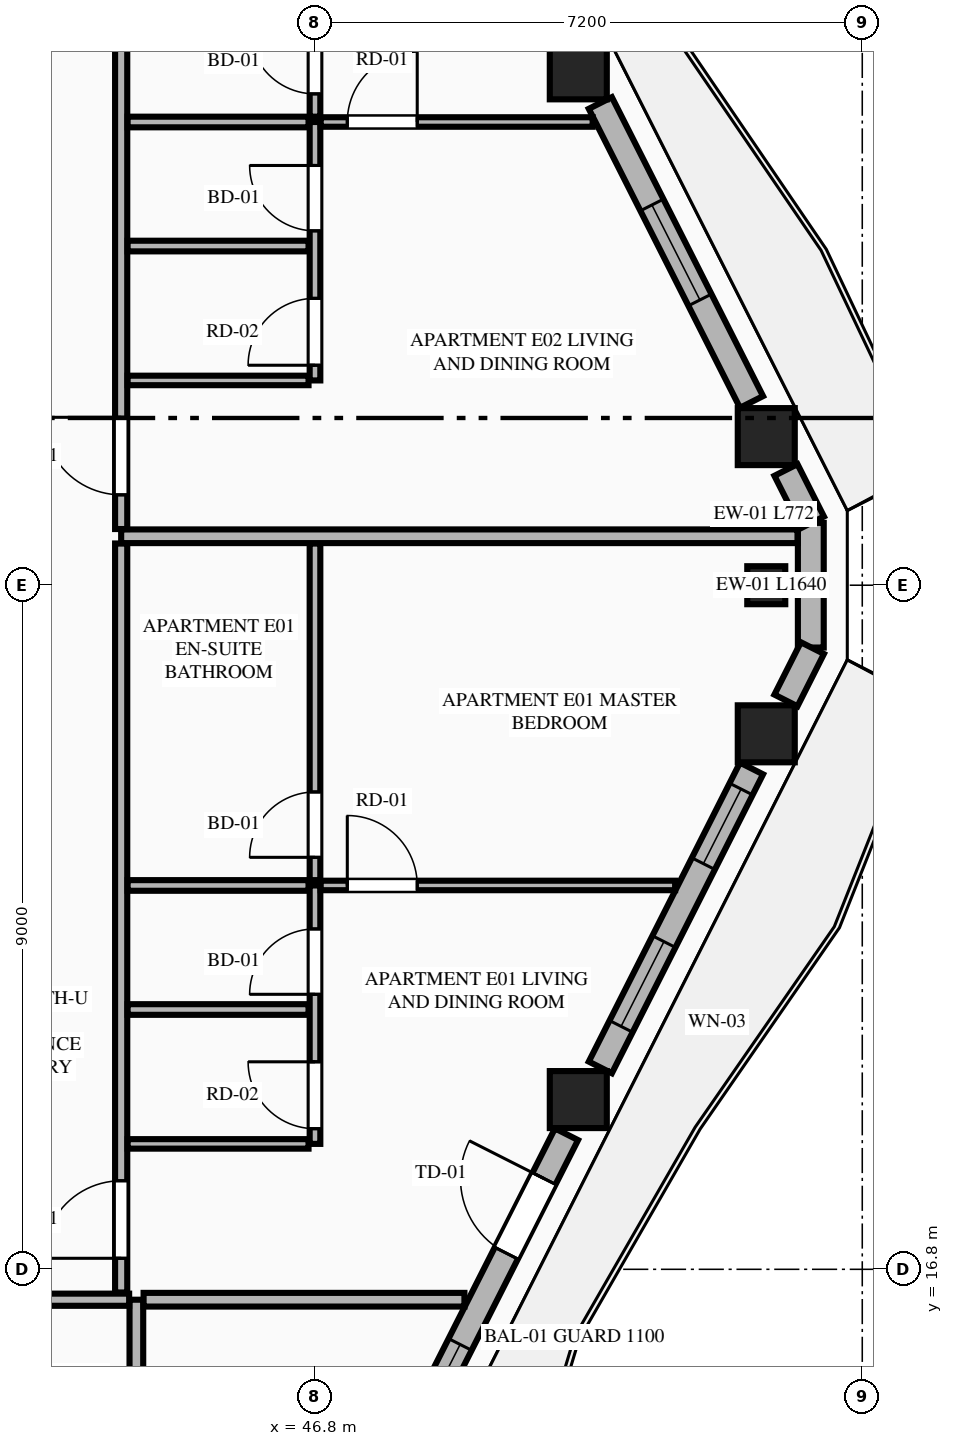
"""IFC4 building model, lengths in metres.
Left out: names, types, materials, properties, quantities, classifications, styles, units other than length and angle.
Written with IfcOpenShell. Run it as: python <this file> out.ifc"""

import sys

from ifc_helpers import new_model, si_unit, direction, frame, frame_2d, origin, origin_2d, place, context, subcontext, project, spatial, rectangle, extrude, element, fill, save


model = new_model("IFC4")
c1 = context("Model", 3, precision=1e-05, world=origin(), true_north=direction((0.0, 1.0)))
c2 = subcontext(c1, "Body", "Model", "MODEL_VIEW")
j1 = project(units=[si_unit("LENGTHUNIT", "METRE"), si_unit("PLANEANGLEUNIT", "RADIAN")], contexts=[c1])
p1 = place(None, origin())
s1 = spatial("IfcSite", under=j1, at=p1, CompositionType="ELEMENT")
p2 = place(p1, origin())
s2 = spatial("IfcBuilding", under=s1, at=p2, CompositionType="ELEMENT")
p3 = place(p2, frame((0.0, 0.0, 256.2)))
s3 = spatial("IfcBuildingStorey", under=s2, at=p3, CompositionType="ELEMENT", Elevation=256.2)
for number, where, z_axis, x_axis in (
    (1, (50.264, 19.033, 0.0), (0.0, 0.0, 1.0), (1.0, 0.0, 0.0)),
    (2, (52.737, 23.845, 0.0), (0.0, 0.0, 1.0), (1.0, 0.0, 0.0)),
    (3, (52.737, 27.755, 0.0), (0.0, 0.0, 1.0), (1.0, 0.0, 0.0)),
    (4, (50.264, 32.567, 0.0), (0.0, 0.0, 1.0), (1.0, 0.0, 0.0)),
):
    element("IfcColumn", number, at=place(p3, frame(where, z_axis=z_axis, x_axis=x_axis)), inside=s3, PredefinedType="COLUMN", context=c2, shape_type="SweptSolid", body=[
        extrude(rectangle(XDim=0.75, YDim=0.75, at=origin_2d()), origin(), (0.0, 0.0, 1.0), 3.65),
    ])
p4 = place(p3, frame((52.737, 25.8, 0.0), z_axis=(0.0, 0.0, 1.0), x_axis=(0.0, 1.0, 0.0)))
e5 = element("IfcColumn", 5, at=p4, inside=s3, PredefinedType="PILASTER", context=c2, shape_type="SweptSolid", body=[
    extrude(rectangle(XDim=0.5, YDim=0.35, at=origin_2d()), origin(), (0.0, 0.0, 1.0), 3.65),
])
p5 = place(p3, frame((53.323, 24.98, 0.0), z_axis=(0.0, 0.0, 1.0), x_axis=(0.0, 1.0, 0.0)))
e6 = element("IfcWall", 6, at=p5, inside=s3, PredefinedType="STANDARD", context=c2, shape_type="SweptSolid", body=[
    extrude(rectangle(XDim=1.64, YDim=0.34, at=frame_2d((0.82, 0.0))), origin(), (0.0, 0.0, 1.0), 3.45),
])
p6 = place(p3, frame((48.032, 14.473, 0.0), z_axis=(0.0, 0.0, 1.0), x_axis=(0.451539564999, 0.892251097641, 0.0)))
e7 = element("IfcWall", 7, at=p6, inside=s3, PredefinedType="STANDARD", context=c2, shape_type="SweptSolid", body=[
    extrude(rectangle(XDim=4.6, YDim=0.34, at=frame_2d((2.3, 0.0))), origin(), (0.0, 0.0, 1.0), 2.983),
])
p7 = place(p6, frame((2.846, 0.0, 0.0)))
e8 = element("IfcOpeningElement", 8, at=p7, cuts=e7, PredefinedType="OPENING", context=c2, shape_type="SweptSolid", body=[
    extrude(rectangle(XDim=1.1, YDim=2.25, at=frame_2d((0.55, 1.125))), frame((0.0, 0.18, 0.0), z_axis=(0.0, -1.0, 0.0), x_axis=(1.0, 0.0, 0.0)), (0.0, 0.0, 1.0), 0.36),
])
p8 = place(p6, frame((0.4, 0.0, 0.75)))
e9 = element("IfcOpeningElement", 9, at=p8, cuts=e7, PredefinedType="OPENING", context=c2, shape_type="SweptSolid", body=[
    extrude(rectangle(XDim=1.1, YDim=2.0, at=frame_2d((0.55, 1.0))), frame((0.0, 0.18, 0.0), z_axis=(0.0, -1.0, 0.0), x_axis=(1.0, 0.0, 0.0)), (0.0, 0.0, 1.0), 0.36),
])
p9 = place(p3, frame((50.554, 19.456, 0.0), z_axis=(0.0, 0.0, 1.0), x_axis=(0.45130817501, 0.892368158984, 0.0)))
e10 = element("IfcWall", 10, at=p9, inside=s3, PredefinedType="STANDARD", context=c2, shape_type="SweptSolid", body=[
    extrude(rectangle(XDim=4.407, YDim=0.34, at=frame_2d((2.204, 0.0))), origin(), (0.0, 0.0, 1.0), 2.983),
])
p10 = place(p9, frame((0.605, 0.0, 0.75)))
e11 = element("IfcOpeningElement", 11, at=p10, cuts=e10, PredefinedType="OPENING", context=c2, shape_type="SweptSolid", body=[
    extrude(rectangle(XDim=1.25, YDim=1.95, at=frame_2d((0.625, 0.975))), frame((0.0, 0.18, 0.0), z_axis=(0.0, -1.0, 0.0), x_axis=(1.0, 0.0, 0.0)), (0.0, 0.0, 1.0), 0.36),
])
p11 = place(p9, frame((3.004, 0.0, 0.75)))
e12 = element("IfcOpeningElement", 12, at=p11, cuts=e10, PredefinedType="OPENING", context=c2, shape_type="SweptSolid", body=[
    extrude(rectangle(XDim=1.1, YDim=2.0, at=frame_2d((0.55, 1.0))), frame((0.0, 0.18, 0.0), z_axis=(0.0, -1.0, 0.0), x_axis=(1.0, 0.0, 0.0)), (0.0, 0.0, 1.0), 0.36),
])
for number, where, z_axis, x_axis in (
    (13, (52.996, 24.284, 0.0), (0.0, 0.0, 1.0), (0.451, 0.893, 0.0)),
    (14, (53.344, 26.627, 0.0), (0.0, 0.0, 1.0), (-0.451, 0.893, 0.0)),
):
    element("IfcWall", number, at=place(p3, frame(where, z_axis=z_axis, x_axis=x_axis)), inside=s3, PredefinedType="STANDARD", context=c2, shape_type="SweptSolid", body=[
        extrude(rectangle(XDim=0.772, YDim=0.34, at=frame_2d((0.386, 0.0))), origin(), (0.0, 0.0, 1.0), 3.45),
    ])
p12 = place(p3, frame((52.543, 28.211, 0.0), z_axis=(0.0, 0.0, 1.0), x_axis=(-0.451285866323, 0.892379441077, 0.0)))
e15 = element("IfcWall", 15, at=p12, inside=s3, PredefinedType="STANDARD", context=c2, shape_type="SweptSolid", body=[
    extrude(rectangle(XDim=4.407, YDim=0.34, at=frame_2d((2.204, 0.0))), origin(), (0.0, 0.0, 1.0), 2.983),
])
p13 = place(p12, frame((1.504, 0.0, 0.75)))
e16 = element("IfcOpeningElement", 16, at=p13, cuts=e15, PredefinedType="OPENING", context=c2, shape_type="SweptSolid", body=[
    extrude(rectangle(XDim=1.4, YDim=2.05, at=frame_2d((0.7, 1.025))), frame((0.0, 0.18, 0.0), z_axis=(0.0, -1.0, 0.0), x_axis=(1.0, 0.0, 0.0)), (0.0, 0.0, 1.0), 0.36),
])
p14 = place(p3, frame((44.45, 8.119, 0.0), z_axis=(0.0, 0.0, 1.0), x_axis=(0.0, 1.0, 0.0)))
e17 = element("IfcWall", 17, at=p14, inside=s3, PredefinedType="PARTITIONING", context=c2, shape_type="SweptSolid", body=[
    extrude(rectangle(XDim=8.281, YDim=0.18, at=frame_2d((4.141, 0.0))), origin(), (0.0, 0.0, 1.0), 3.45),
])
p15 = place(p3, frame((35.749, 16.4, 0.0), z_axis=(0.0, 0.0, 1.0), x_axis=(1.0, 0.0, 0.0)))
e18 = element("IfcWall", 18, at=p15, inside=s3, PredefinedType="PARTITIONING", context=c2, shape_type="SweptSolid", body=[
    extrude(rectangle(XDim=8.606, YDim=0.16, at=frame_2d((4.303, 0.0))), origin(), (0.0, 0.0, 1.0), 3.45),
])
p16 = place(p15, frame((0.355, 0.0, 0.0)))
e19 = element("IfcOpeningElement", 19, at=p16, cuts=e18, PredefinedType="OPENING", context=c2, shape_type="SweptSolid", body=[
    extrude(rectangle(XDim=1.02, YDim=2.25, at=frame_2d((0.51, 1.125))), frame((0.0, 0.09, 0.0), z_axis=(0.0, -1.0, 0.0), x_axis=(1.0, 0.0, 0.0)), (0.0, 0.0, 1.0), 0.18),
])
p17 = place(p3, frame((44.545, 16.4, 0.0), z_axis=(0.0, 0.0, 1.0), x_axis=(1.0, 0.0, 0.0)))
e20 = element("IfcWall", 20, at=p17, inside=s3, PredefinedType="PARTITIONING", context=c2, shape_type="SweptSolid", body=[
    extrude(rectangle(XDim=4.221, YDim=0.18, at=frame_2d((2.111, 0.0))), origin(), (0.0, 0.0, 1.0), 3.45),
])
p18 = place(p3, frame((44.25, 16.495, 0.0), z_axis=(0.0, 0.0, 1.0), x_axis=(0.0, 1.0, 0.0)))
e21 = element("IfcWall", 21, at=p18, inside=s3, PredefinedType="PARTITIONING", context=c2, shape_type="SweptSolid", body=[
    extrude(rectangle(XDim=9.854, YDim=0.16, at=frame_2d((4.927, 0.0))), origin(), (0.0, 0.0, 1.0), 3.137),
])
p19 = place(p18, frame((0.45, 0.0, 0.0)))
e22 = element("IfcOpeningElement", 22, at=p19, cuts=e21, PredefinedType="OPENING", context=c2, shape_type="SweptSolid", body=[
    extrude(rectangle(XDim=1.02, YDim=2.25, at=frame_2d((0.51, 1.125))), frame((0.0, 0.09, 0.0), z_axis=(0.0, -1.0, 0.0), x_axis=(1.0, 0.0, 0.0)), (0.0, 0.0, 1.0), 0.18),
])
p20 = place(p3, frame((44.335, 18.45, 0.0), z_axis=(0.0, 0.0, 1.0), x_axis=(1.0, 0.0, 0.0)))
e23 = element("IfcWall", 23, at=p20, inside=s3, PredefinedType="PARTITIONING", context=c2, shape_type="SweptSolid", body=[
    extrude(rectangle(XDim=2.38, YDim=0.125, at=frame_2d((1.19, 0.0))), origin(), (0.0, 0.0, 1.0), 3.45),
])
p21 = place(p3, frame((46.8, 18.45, 0.0), z_axis=(0.0, 0.0, 1.0), x_axis=(0.0, 1.0, 0.0)))
e24 = element("IfcWall", 24, at=p21, inside=s3, PredefinedType="PLUMBINGWALL", context=c2, shape_type="SweptSolid", body=[
    extrude(rectangle(XDim=3.4, YDim=0.14, at=frame_2d((1.7, 0.0))), origin(), (0.0, 0.0, 1.0), 3.45),
])
p22 = place(p21, frame((0.2, 0.0, 0.0)))
e25 = element("IfcOpeningElement", 25, at=p22, cuts=e24, PredefinedType="OPENING", context=c2, shape_type="SweptSolid", body=[
    extrude(rectangle(XDim=0.88, YDim=2.15, at=frame_2d((0.44, 1.075))), frame((0.0, 0.08, 0.0), z_axis=(0.0, -1.0, 0.0), x_axis=(1.0, 0.0, 0.0)), (0.0, 0.0, 1.0), 0.16),
])
p23 = place(p21, frame((1.968, 0.0, 0.0)))
e26 = element("IfcOpeningElement", 26, at=p23, cuts=e24, PredefinedType="OPENING", context=c2, shape_type="SweptSolid", body=[
    extrude(rectangle(XDim=0.86, YDim=2.1, at=frame_2d((0.43, 1.05))), frame((0.0, 0.08, 0.0), z_axis=(0.0, -1.0, 0.0), x_axis=(1.0, 0.0, 0.0)), (0.0, 0.0, 1.0), 0.16),
])
p24 = place(p3, frame((46.8, 21.92, 0.0), z_axis=(0.0, 0.0, 1.0), x_axis=(0.0, 1.0, 0.0)))
e27 = element("IfcWall", 27, at=p24, inside=s3, PredefinedType="PLUMBINGWALL", context=c2, shape_type="SweptSolid", body=[
    extrude(rectangle(XDim=4.429, YDim=0.14, at=frame_2d((2.215, 0.0))), origin(), (0.0, 0.0, 1.0), 3.45),
])
p25 = place(p24, frame((0.3, 0.0, 0.0)))
e28 = element("IfcOpeningElement", 28, at=p25, cuts=e27, PredefinedType="OPENING", context=c2, shape_type="SweptSolid", body=[
    extrude(rectangle(XDim=0.86, YDim=2.1, at=frame_2d((0.43, 1.05))), frame((0.0, 0.08, 0.0), z_axis=(0.0, -1.0, 0.0), x_axis=(1.0, 0.0, 0.0)), (0.0, 0.0, 1.0), 0.16),
])
p26 = place(p3, frame((44.335, 21.85, 0.0), z_axis=(0.0, 0.0, 1.0), x_axis=(1.0, 0.0, 0.0)))
e29 = element("IfcWall", 29, at=p26, inside=s3, PredefinedType="PLUMBINGWALL", context=c2, shape_type="SweptSolid", body=[
    extrude(rectangle(XDim=2.38, YDim=0.14, at=frame_2d((1.19, 0.0))), origin(), (0.0, 0.0, 1.0), 3.45),
])
p27 = place(p3, frame((46.875, 21.85, 0.0), z_axis=(0.0, 0.0, 1.0), x_axis=(1.0, 0.0, 0.0)))
e30 = element("IfcWall", 30, at=p27, inside=s3, PredefinedType="PARTITIONING", context=c2, shape_type="SweptSolid", body=[
    extrude(rectangle(XDim=4.663, YDim=0.125, at=frame_2d((2.332, 0.0))), origin(), (0.0, 0.0, 1.0), 3.45),
])
p28 = place(p27, frame((0.35, 0.0, 0.0)))
e31 = element("IfcOpeningElement", 31, at=p28, cuts=e30, PredefinedType="OPENING", context=c2, shape_type="SweptSolid", body=[
    extrude(rectangle(XDim=0.92, YDim=2.15, at=frame_2d((0.46, 1.075))), frame((0.0, 0.073, 0.0), z_axis=(0.0, -1.0, 0.0), x_axis=(1.0, 0.0, 0.0)), (0.0, 0.0, 1.0), 0.145),
])
p29 = place(p3, frame((44.335, 20.218, 0.0), z_axis=(0.0, 0.0, 1.0), x_axis=(1.0, 0.0, 0.0)))
e32 = element("IfcWall", 32, at=p29, inside=s3, PredefinedType="PLUMBINGWALL", context=c2, shape_type="SweptSolid", body=[
    extrude(rectangle(XDim=2.38, YDim=0.14, at=frame_2d((1.19, 0.0))), origin(), (0.0, 0.0, 1.0), 3.45),
])
p30 = place(p3, frame((44.25, 26.444, 0.0), z_axis=(0.0, 0.0, 1.0), x_axis=(1.0, 0.0, 0.0)))
e33 = element("IfcWall", 33, at=p30, inside=s3, PredefinedType="PARTITIONING", context=c2, shape_type="SweptSolid", body=[
    extrude(rectangle(XDim=8.898, YDim=0.18, at=frame_2d((4.449, 0.0))), origin(), (0.0, 0.0, 1.0), 3.45),
])
p31 = place(p3, frame((44.25, 26.539, 0.0), z_axis=(0.0, 0.0, 1.0), x_axis=(0.0, 1.0, 0.0)))
e34 = element("IfcWall", 34, at=p31, inside=s3, PredefinedType="PARTITIONING", context=c2, shape_type="SweptSolid", body=[
    extrude(rectangle(XDim=8.366, YDim=0.16, at=frame_2d((4.183, 0.0))), origin(), (0.0, 0.0, 1.0), 3.137),
])
p32 = place(p31, frame((0.45, 0.0, 0.0)))
e35 = element("IfcOpeningElement", 35, at=p32, cuts=e34, PredefinedType="OPENING", context=c2, shape_type="SweptSolid", body=[
    extrude(rectangle(XDim=1.02, YDim=2.25, at=frame_2d((0.51, 1.125))), frame((0.0, 0.09, 0.0), z_axis=(0.0, -1.0, 0.0), x_axis=(1.0, 0.0, 0.0)), (0.0, 0.0, 1.0), 0.18),
])
p33 = place(p3, frame((44.335, 28.494, 0.0), z_axis=(0.0, 0.0, 1.0), x_axis=(1.0, 0.0, 0.0)))
e36 = element("IfcWall", 36, at=p33, inside=s3, PredefinedType="PARTITIONING", context=c2, shape_type="SweptSolid", body=[
    extrude(rectangle(XDim=2.38, YDim=0.125, at=frame_2d((1.19, 0.0))), origin(), (0.0, 0.0, 1.0), 3.45),
])
p34 = place(p3, frame((46.8, 28.494, 0.0), z_axis=(0.0, 0.0, 1.0), x_axis=(0.0, 1.0, 0.0)))
e37 = element("IfcWall", 37, at=p34, inside=s3, PredefinedType="PLUMBINGWALL", context=c2, shape_type="SweptSolid", body=[
    extrude(rectangle(XDim=3.4, YDim=0.14, at=frame_2d((1.7, 0.0))), origin(), (0.0, 0.0, 1.0), 3.45),
])
p35 = place(p34, frame((0.2, 0.0, 0.0)))
e38 = element("IfcOpeningElement", 38, at=p35, cuts=e37, PredefinedType="OPENING", context=c2, shape_type="SweptSolid", body=[
    extrude(rectangle(XDim=0.88, YDim=2.15, at=frame_2d((0.44, 1.075))), frame((0.0, 0.08, 0.0), z_axis=(0.0, -1.0, 0.0), x_axis=(1.0, 0.0, 0.0)), (0.0, 0.0, 1.0), 0.16),
])
p36 = place(p34, frame((1.968, 0.0, 0.0)))
e39 = element("IfcOpeningElement", 39, at=p36, cuts=e37, PredefinedType="OPENING", context=c2, shape_type="SweptSolid", body=[
    extrude(rectangle(XDim=0.86, YDim=2.1, at=frame_2d((0.43, 1.05))), frame((0.0, 0.08, 0.0), z_axis=(0.0, -1.0, 0.0), x_axis=(1.0, 0.0, 0.0)), (0.0, 0.0, 1.0), 0.16),
])
p37 = place(p3, frame((46.8, 31.964, 0.0), z_axis=(0.0, 0.0, 1.0), x_axis=(0.0, 1.0, 0.0)))
e40 = element("IfcWall", 40, at=p37, inside=s3, PredefinedType="PLUMBINGWALL", context=c2, shape_type="SweptSolid", body=[
    extrude(rectangle(XDim=2.941, YDim=0.14, at=frame_2d((1.47, 0.0))), origin(), (0.0, 0.0, 1.0), 3.45),
])
p38 = place(p37, frame((0.3, 0.0, 0.0)))
e41 = element("IfcOpeningElement", 41, at=p38, cuts=e40, PredefinedType="OPENING", context=c2, shape_type="SweptSolid", body=[
    extrude(rectangle(XDim=0.86, YDim=2.1, at=frame_2d((0.43, 1.05))), frame((0.0, 0.08, 0.0), z_axis=(0.0, -1.0, 0.0), x_axis=(1.0, 0.0, 0.0)), (0.0, 0.0, 1.0), 0.16),
])
p39 = place(p3, frame((44.335, 31.894, 0.0), z_axis=(0.0, 0.0, 1.0), x_axis=(1.0, 0.0, 0.0)))
e42 = element("IfcWall", 42, at=p39, inside=s3, PredefinedType="PLUMBINGWALL", context=c2, shape_type="SweptSolid", body=[
    extrude(rectangle(XDim=2.38, YDim=0.14, at=frame_2d((1.19, 0.0))), origin(), (0.0, 0.0, 1.0), 3.45),
])
p40 = place(p3, frame((46.875, 31.894, 0.0), z_axis=(0.0, 0.0, 1.0), x_axis=(1.0, 0.0, 0.0)))
e43 = element("IfcWall", 43, at=p40, inside=s3, PredefinedType="PARTITIONING", context=c2, shape_type="SweptSolid", body=[
    extrude(rectangle(XDim=3.578, YDim=0.125, at=frame_2d((1.789, 0.0))), origin(), (0.0, 0.0, 1.0), 3.45),
])
p41 = place(p40, frame((0.35, 0.0, 0.0)))
e44 = element("IfcOpeningElement", 44, at=p41, cuts=e43, PredefinedType="OPENING", context=c2, shape_type="SweptSolid", body=[
    extrude(rectangle(XDim=0.92, YDim=2.15, at=frame_2d((0.46, 1.075))), frame((0.0, 0.073, 0.0), z_axis=(0.0, -1.0, 0.0), x_axis=(1.0, 0.0, 0.0)), (0.0, 0.0, 1.0), 0.145),
])
p42 = place(p3, frame((44.335, 30.262, 0.0), z_axis=(0.0, 0.0, 1.0), x_axis=(1.0, 0.0, 0.0)))
e45 = element("IfcWall", 45, at=p42, inside=s3, PredefinedType="PLUMBINGWALL", context=c2, shape_type="SweptSolid", body=[
    extrude(rectangle(XDim=2.38, YDim=0.14, at=frame_2d((1.19, 0.0))), origin(), (0.0, 0.0, 1.0), 3.45),
])
p43 = place(p7, origin())
e46 = element("IfcDoor", 46, at=p43, inside=s3, OperationType="SINGLE_SWING_RIGHT", PredefinedType="DOOR", context=c2, shape_type="SweptSolid", body=[
    extrude(rectangle(XDim=1.1, YDim=2.25, at=frame_2d((0.55, 1.125))), frame((0.0, 0.025, 0.0), z_axis=(0.0, -1.0, 0.0), x_axis=(1.0, 0.0, 0.0)), (0.0, 0.0, 1.0), 0.05),
])
fill(e8, e46)
p44 = place(p10, origin())
e47 = element("IfcWindow", 47, at=p44, inside=s3, PartitioningType="SINGLE_PANEL", PredefinedType="WINDOW", context=c2, shape_type="SweptSolid", body=[
    extrude(rectangle(XDim=1.25, YDim=1.95, at=frame_2d((0.625, 0.975))), frame((0.0, 0.03, 0.0), z_axis=(0.0, -1.0, 0.0), x_axis=(1.0, 0.0, 0.0)), (0.0, 0.0, 1.0), 0.06),
])
fill(e11, e47)
p45 = place(p13, origin())
e48 = element("IfcWindow", 48, at=p45, inside=s3, PartitioningType="SINGLE_PANEL", PredefinedType="WINDOW", context=c2, shape_type="SweptSolid", body=[
    extrude(rectangle(XDim=1.4, YDim=2.05, at=frame_2d((0.7, 1.025))), frame((0.0, 0.03, 0.0), z_axis=(0.0, -1.0, 0.0), x_axis=(1.0, 0.0, 0.0)), (0.0, 0.0, 1.0), 0.06),
])
fill(e16, e48)
p46 = place(p22, origin())
e49 = element("IfcDoor", 49, at=p46, inside=s3, OperationType="SINGLE_SWING_RIGHT", PredefinedType="DOOR", context=c2, shape_type="SweptSolid", body=[
    extrude(rectangle(XDim=0.88, YDim=2.15, at=frame_2d((0.44, 1.075))), frame((0.0, 0.025, 0.0), z_axis=(0.0, -1.0, 0.0), x_axis=(1.0, 0.0, 0.0)), (0.0, 0.0, 1.0), 0.05),
])
fill(e25, e49)
p47 = place(p23, origin())
e50 = element("IfcDoor", 50, at=p47, inside=s3, OperationType="SINGLE_SWING_LEFT", PredefinedType="DOOR", context=c2, shape_type="SweptSolid", body=[
    extrude(rectangle(XDim=0.86, YDim=2.1, at=frame_2d((0.43, 1.05))), frame((0.0, 0.025, 0.0), z_axis=(0.0, -1.0, 0.0), x_axis=(1.0, 0.0, 0.0)), (0.0, 0.0, 1.0), 0.05),
])
fill(e26, e50)
p48 = place(p25, origin())
e51 = element("IfcDoor", 51, at=p48, inside=s3, OperationType="SINGLE_SWING_LEFT", PredefinedType="DOOR", context=c2, shape_type="SweptSolid", body=[
    extrude(rectangle(XDim=0.86, YDim=2.1, at=frame_2d((0.43, 1.05))), frame((0.0, 0.025, 0.0), z_axis=(0.0, -1.0, 0.0), x_axis=(1.0, 0.0, 0.0)), (0.0, 0.0, 1.0), 0.05),
])
fill(e28, e51)
p49 = place(p19, origin())
e52 = element("IfcDoor", 52, at=p49, inside=s3, OperationType="SINGLE_SWING_LEFT", PredefinedType="DOOR", context=c2, shape_type="SweptSolid", body=[
    extrude(rectangle(XDim=1.02, YDim=2.25, at=frame_2d((0.51, 1.125))), frame((0.0, 0.025, 0.0), z_axis=(0.0, -1.0, 0.0), x_axis=(1.0, 0.0, 0.0)), (0.0, 0.0, 1.0), 0.05),
])
fill(e22, e52)
p50 = place(p28, origin())
e53 = element("IfcDoor", 53, at=p50, inside=s3, OperationType="SINGLE_SWING_LEFT", PredefinedType="DOOR", context=c2, shape_type="SweptSolid", body=[
    extrude(rectangle(XDim=0.92, YDim=2.15, at=frame_2d((0.46, 1.075))), frame((0.0, 0.025, 0.0), z_axis=(0.0, -1.0, 0.0), x_axis=(1.0, 0.0, 0.0)), (0.0, 0.0, 1.0), 0.05),
])
fill(e31, e53)
p51 = place(p35, origin())
e54 = element("IfcDoor", 54, at=p51, inside=s3, OperationType="SINGLE_SWING_LEFT", PredefinedType="DOOR", context=c2, shape_type="SweptSolid", body=[
    extrude(rectangle(XDim=0.88, YDim=2.15, at=frame_2d((0.44, 1.075))), frame((0.0, 0.025, 0.0), z_axis=(0.0, -1.0, 0.0), x_axis=(1.0, 0.0, 0.0)), (0.0, 0.0, 1.0), 0.05),
])
fill(e38, e54)
p52 = place(p36, origin())
e55 = element("IfcDoor", 55, at=p52, inside=s3, OperationType="SINGLE_SWING_RIGHT", PredefinedType="DOOR", context=c2, shape_type="SweptSolid", body=[
    extrude(rectangle(XDim=0.86, YDim=2.1, at=frame_2d((0.43, 1.05))), frame((0.0, 0.025, 0.0), z_axis=(0.0, -1.0, 0.0), x_axis=(1.0, 0.0, 0.0)), (0.0, 0.0, 1.0), 0.05),
])
fill(e39, e55)
p53 = place(p38, origin())
e56 = element("IfcDoor", 56, at=p53, inside=s3, OperationType="SINGLE_SWING_RIGHT", PredefinedType="DOOR", context=c2, shape_type="SweptSolid", body=[
    extrude(rectangle(XDim=0.86, YDim=2.1, at=frame_2d((0.43, 1.05))), frame((0.0, 0.025, 0.0), z_axis=(0.0, -1.0, 0.0), x_axis=(1.0, 0.0, 0.0)), (0.0, 0.0, 1.0), 0.05),
])
fill(e41, e56)
p54 = place(p32, origin())
e57 = element("IfcDoor", 57, at=p54, inside=s3, OperationType="SINGLE_SWING_RIGHT", PredefinedType="DOOR", context=c2, shape_type="SweptSolid", body=[
    extrude(rectangle(XDim=1.02, YDim=2.25, at=frame_2d((0.51, 1.125))), frame((0.0, 0.025, 0.0), z_axis=(0.0, -1.0, 0.0), x_axis=(1.0, 0.0, 0.0)), (0.0, 0.0, 1.0), 0.05),
])
fill(e35, e57)
p55 = place(p41, origin())
e58 = element("IfcDoor", 58, at=p55, inside=s3, OperationType="SINGLE_SWING_RIGHT", PredefinedType="DOOR", context=c2, shape_type="SweptSolid", body=[
    extrude(rectangle(XDim=0.92, YDim=2.15, at=frame_2d((0.46, 1.075))), frame((0.0, 0.025, 0.0), z_axis=(0.0, -1.0, 0.0), x_axis=(1.0, 0.0, 0.0)), (0.0, 0.0, 1.0), 0.05),
])
fill(e44, e58)
p56 = place(p8, origin())
e59 = element("IfcWindow", 59, at=p56, inside=s3, PartitioningType="SINGLE_PANEL", PredefinedType="WINDOW", context=c2, shape_type="SweptSolid", body=[
    extrude(rectangle(XDim=1.1, YDim=2.0, at=frame_2d((0.55, 1.0))), frame((0.0, 0.03, 0.0), z_axis=(0.0, -1.0, 0.0), x_axis=(1.0, 0.0, 0.0)), (0.0, 0.0, 1.0), 0.06),
])
fill(e9, e59)
p57 = place(p11, origin())
e60 = element("IfcWindow", 60, at=p57, inside=s3, PartitioningType="SINGLE_PANEL", PredefinedType="WINDOW", context=c2, shape_type="SweptSolid", body=[
    extrude(rectangle(XDim=1.1, YDim=2.0, at=frame_2d((0.55, 1.0))), frame((0.0, 0.03, 0.0), z_axis=(0.0, -1.0, 0.0), x_axis=(1.0, 0.0, 0.0)), (0.0, 0.0, 1.0), 0.06),
])
fill(e12, e60)
save(model, sys.argv[1])
